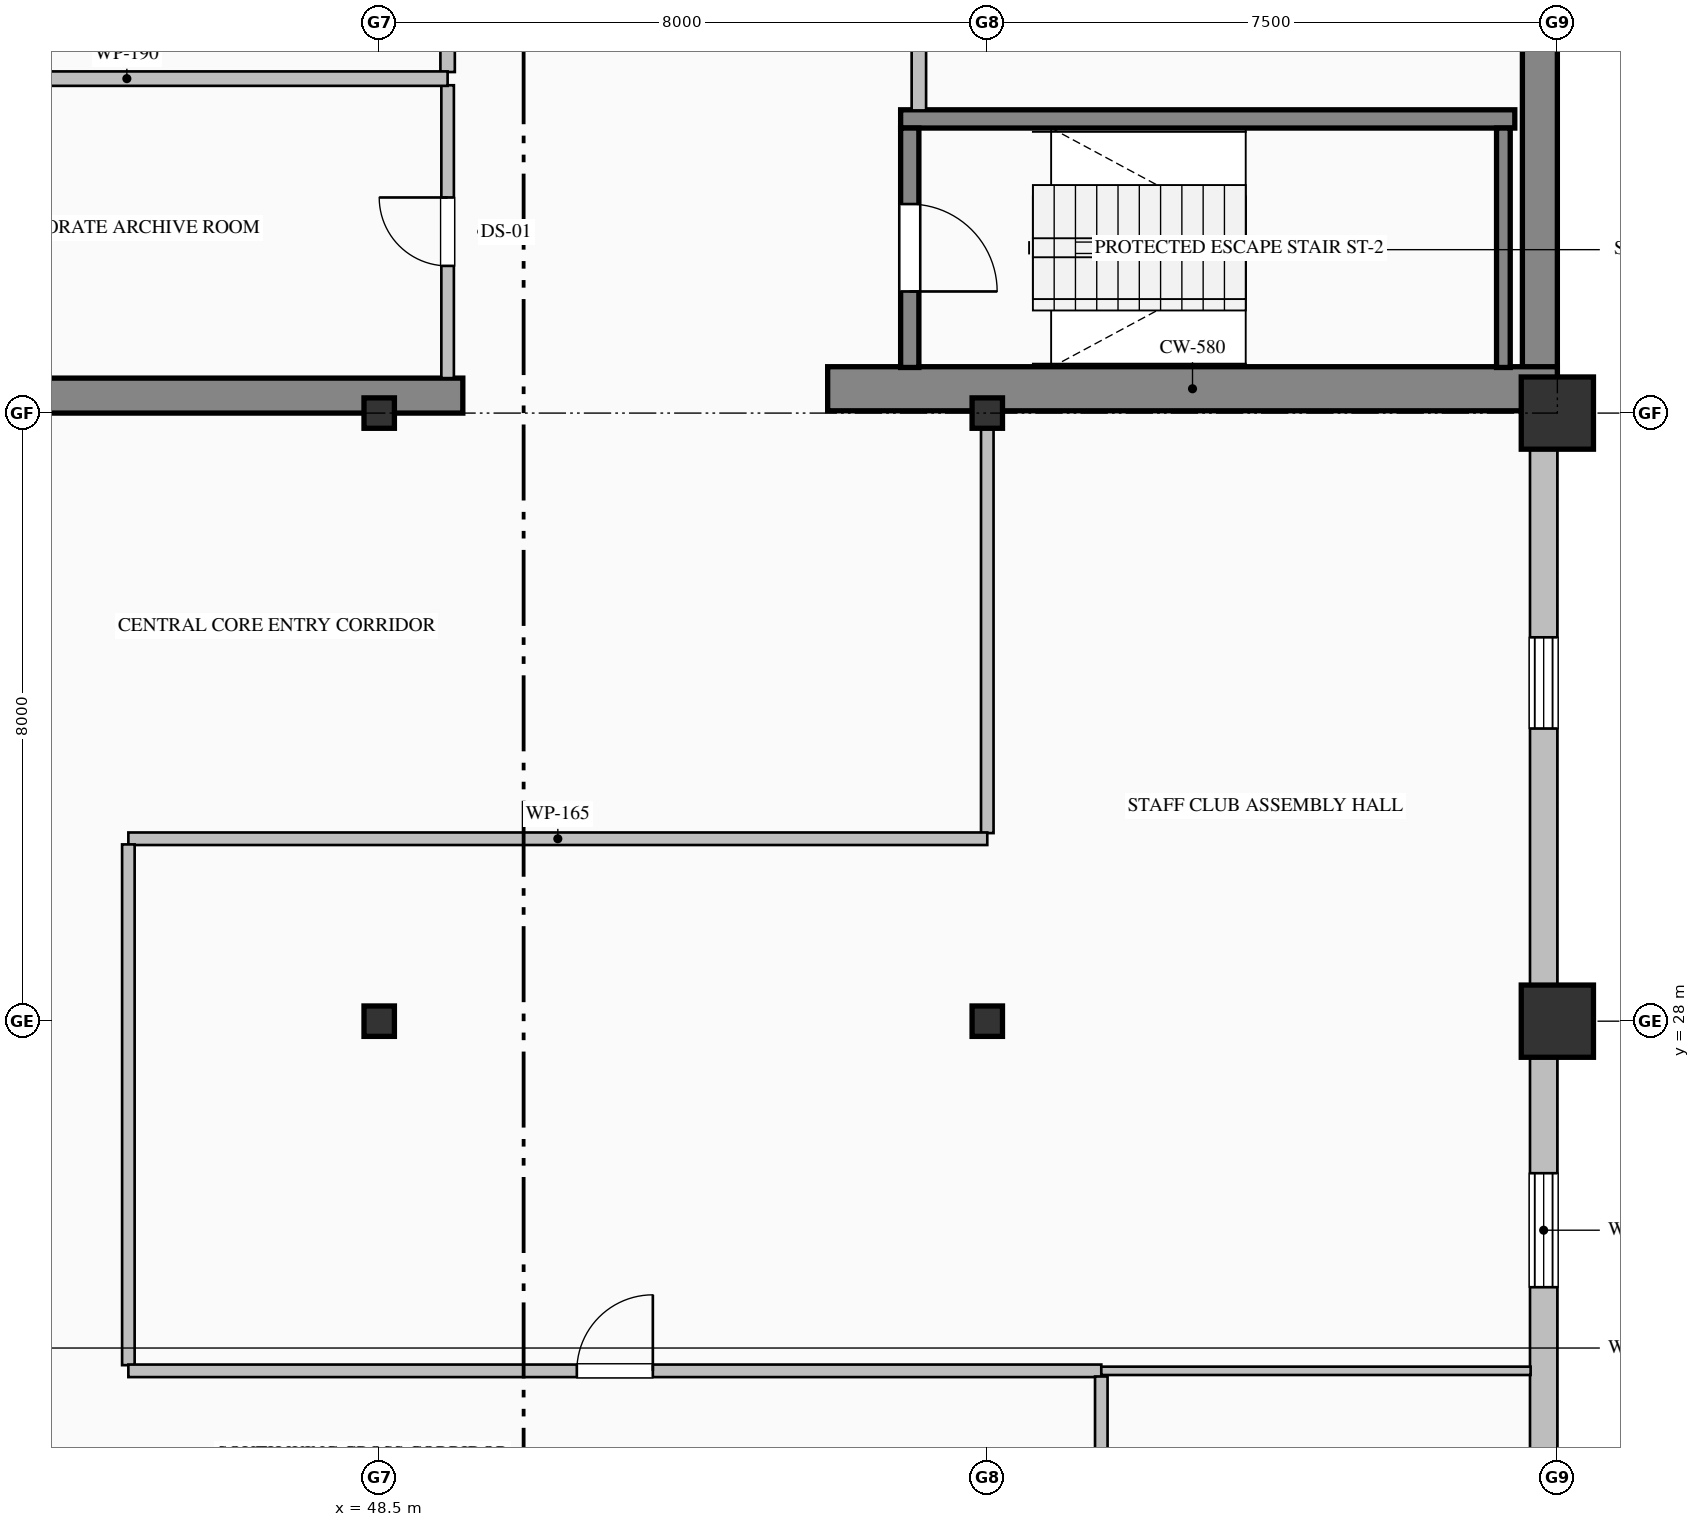
"""IFC4 building model, lengths in metres.
Left out: names, types, materials, properties, quantities, classifications, styles, units other than length and angle.
Written with IfcOpenShell. Run it as: python <this file> out.ifc"""

import sys

from ifc_helpers import new_model, si_unit, direction, frame, frame_2d, origin, origin_2d, place, context, subcontext, project, spatial, rectangle, hollow_rectangle, i_section, extrude, element, fill, save


model = new_model("IFC4")
c1 = context("Model", 3, precision=1e-05, world=origin(), true_north=direction((0.0, 1.0)))
c2 = subcontext(c1, "Body", "Model", "MODEL_VIEW")
j1 = project(units=[si_unit("LENGTHUNIT", "METRE"), si_unit("PLANEANGLEUNIT", "RADIAN")], contexts=[c1])
p1 = place(None, origin())
s1 = spatial("IfcSite", under=j1, at=p1, CompositionType="ELEMENT")
p2 = place(p1, origin())
s2 = spatial("IfcBuilding", under=s1, at=p2, CompositionType="ELEMENT")
p3 = place(p2, frame((0.0, 0.0, 237.8)))
s3 = spatial("IfcBuildingStorey", under=s2, at=p3, CompositionType="ELEMENT", Elevation=237.8)
p4 = place(p3, frame((63.77, 36.32, 0.0), z_axis=(0.0, 0.0, 1.0), x_axis=(0.0, 1.0, 0.0)))
e1 = element("IfcWall", 1, at=p4, inside=s3, PredefinedType="SHEAR", context=c2, shape_type="SweptSolid", body=[
    extrude(rectangle(XDim=15.22, YDim=0.46, at=frame_2d((7.61, 0.0))), origin(), (0.0, 0.0, 1.0), 3.775),
])
p5 = place(p3, frame((40.5, 36.23, 0.0), z_axis=(0.0, 0.0, 1.0), x_axis=(1.0, 0.0, 0.0)))
e2 = element("IfcWall", 2, at=p5, inside=s3, PredefinedType="SHEAR", context=c2, shape_type="SweptSolid", body=[
    extrude(rectangle(XDim=9.1, YDim=0.46, at=frame_2d((4.55, 0.0))), origin(), (0.0, 0.0, 1.0), 3.775),
])
p6 = place(p3, frame((54.4, 36.32, 0.0), z_axis=(0.0, 0.0, 1.0), x_axis=(1.0, 0.0, 0.0)))
e3 = element("IfcWall", 3, at=p6, inside=s3, PredefinedType="SHEAR", context=c2, shape_type="SweptSolid", body=[
    extrude(rectangle(XDim=9.6, YDim=0.58, at=frame_2d((4.8, 0.0))), origin(), (0.0, 0.0, 1.0), 4.0),
])
for number, where, z_axis, x_axis in (
    (4, (48.5, 28.0, 0.0), (0.0, 0.0, 1.0), (1.0, 0.0, 0.0)),
    (5, (48.5, 36.0, 0.0), (0.0, 0.0, 1.0), (1.0, 0.0, 0.0)),
    (6, (56.5, 28.0, 0.0), (0.0, 0.0, 1.0), (1.0, 0.0, 0.0)),
    (7, (56.5, 36.0, 0.0), (0.0, 0.0, 1.0), (1.0, 0.0, 0.0)),
):
    element("IfcColumn", number, at=place(p3, frame(where, z_axis=z_axis, x_axis=x_axis)), inside=s3, PredefinedType="COLUMN", context=c2, shape_type="SweptSolid", body=[
        extrude(i_section(OverallWidth=0.4, OverallDepth=0.4, WebThickness=0.013, FlangeThickness=0.021, FilletRadius=0.022, at=origin_2d()), origin(), (0.0, 0.0, 1.0), 4.0),
    ])
for number, where, z_axis, x_axis in (
    (8, (64.0, 28.0, 0.0), (0.0, 0.0, 1.0), (1.0, 0.0, 0.0)),
    (9, (64.0, 36.0, 0.0), (0.0, 0.0, 1.0), (1.0, 0.0, 0.0)),
):
    element("IfcColumn", number, at=place(p3, frame(where, z_axis=z_axis, x_axis=x_axis)), inside=s3, PredefinedType="COLUMN", context=c2, shape_type="SweptSolid", body=[
        extrude(hollow_rectangle(XDim=0.95, YDim=0.95, WallThickness=0.036, at=origin_2d()), origin(), (0.0, 0.0, 1.0), 4.0),
    ])
p7 = place(p3, frame((63.82, 36.05, 0.0), z_axis=(0.0, 0.0, 1.0), x_axis=(0.0, -1.0, 0.0)))
e10 = element("IfcWall", 10, at=p7, inside=s3, PredefinedType="SOLIDWALL", context=c2, shape_type="SweptSolid", body=[
    extrude(rectangle(XDim=19.55, YDim=0.36, at=frame_2d((9.775, 0.0))), origin(), (0.0, 0.0, 1.0), 3.325),
])
p8 = place(p7, frame((3.0, 0.0, 0.9)))
e11 = element("IfcOpeningElement", 11, at=p8, cuts=e10, PredefinedType="OPENING", context=c2, shape_type="SweptSolid", body=[
    extrude(rectangle(XDim=1.2, YDim=1.85, at=frame_2d((0.6, 0.925))), frame((0.0, 0.19, 0.0), z_axis=(0.0, -1.0, 0.0), x_axis=(1.0, 0.0, 0.0)), (0.0, 0.0, 1.0), 0.38),
])
p9 = place(p7, frame((10.05, 0.0, 0.7)))
e12 = element("IfcOpeningElement", 12, at=p9, cuts=e10, PredefinedType="OPENING", context=c2, shape_type="SweptSolid", body=[
    extrude(rectangle(XDim=1.5, YDim=2.4, at=frame_2d((0.75, 1.2))), frame((0.0, 0.19, 0.0), z_axis=(0.0, -1.0, 0.0), x_axis=(1.0, 0.0, 0.0)), (0.0, 0.0, 1.0), 0.38),
])
p10 = place(p7, frame((13.8, 0.0, 0.9)))
e13 = element("IfcOpeningElement", 13, at=p10, cuts=e10, PredefinedType="OPENING", context=c2, shape_type="SweptSolid", body=[
    extrude(rectangle(XDim=1.2, YDim=1.85, at=frame_2d((0.6, 0.925))), frame((0.0, 0.19, 0.0), z_axis=(0.0, -1.0, 0.0), x_axis=(1.0, 0.0, 0.0)), (0.0, 0.0, 1.0), 0.38),
])
p11 = place(p3, frame((55.36, 39.87, 0.0), z_axis=(0.0, 0.0, 1.0), x_axis=(1.0, 0.0, 0.0)))
e14 = element("IfcWall", 14, at=p11, inside=s3, PredefinedType="SOLIDWALL", context=c2, shape_type="SweptSolid", body=[
    extrude(rectangle(XDim=8.08, YDim=0.24, at=frame_2d((4.04, 0.0))), origin(), (0.0, 0.0, 1.0), 4.0),
])
p12 = place(p3, frame((55.48, 39.75, 0.0), z_axis=(0.0, 0.0, 1.0), x_axis=(0.0, -1.0, 0.0)))
e15 = element("IfcWall", 15, at=p12, inside=s3, PredefinedType="SOLIDWALL", context=c2, shape_type="SweptSolid", body=[
    extrude(rectangle(XDim=3.15, YDim=0.24, at=frame_2d((1.575, 0.0))), origin(), (0.0, 0.0, 1.0), 4.0),
])
p13 = place(p12, frame((1.0, 0.0, 0.0)))
e16 = element("IfcOpeningElement", 16, at=p13, cuts=e15, PredefinedType="OPENING", context=c2, shape_type="SweptSolid", body=[
    extrude(rectangle(XDim=1.15, YDim=2.2, at=frame_2d((0.575, 1.1))), frame((0.0, 0.13, 0.0), z_axis=(0.0, -1.0, 0.0), x_axis=(1.0, 0.0, 0.0)), (0.0, 0.0, 1.0), 0.26),
])
p14 = place(p3, frame((63.29, 36.6, 0.0), z_axis=(0.0, 0.0, 1.0), x_axis=(0.0, 1.0, 0.0)))
e17 = element("IfcWall", 17, at=p14, inside=s3, PredefinedType="SOLIDWALL", context=c2, shape_type="SweptSolid", body=[
    extrude(rectangle(XDim=3.15, YDim=0.18, at=frame_2d((1.575, 0.0))), origin(), (0.0, 0.0, 1.0), 4.0),
])
p15 = place(p3, frame((49.4, 36.46, 0.0), z_axis=(0.0, 0.0, 1.0), x_axis=(0.0, 1.0, 0.0)))
e18 = element("IfcWall", 18, at=p15, inside=s3, PredefinedType="PARTITIONING", context=c2, shape_type="SweptSolid", body=[
    extrude(rectangle(XDim=3.853, YDim=0.165, at=frame_2d((1.927, 0.0))), origin(), (0.0, 0.0, 1.0), 3.017),
])
p16 = place(p15, frame((1.477, 0.0, 0.0)))
e19 = element("IfcOpeningElement", 19, at=p16, cuts=e18, PredefinedType="OPENING", context=c2, shape_type="SweptSolid", body=[
    extrude(rectangle(XDim=0.9, YDim=2.15, at=frame_2d((0.45, 1.075))), frame((0.0, 0.093, 0.0), z_axis=(0.0, -1.0, 0.0), x_axis=(1.0, 0.0, 0.0)), (0.0, 0.0, 1.0), 0.185),
])
p17 = place(p3, frame((49.4, 40.487, 0.0), z_axis=(0.0, 0.0, 1.0), x_axis=(0.0, 1.0, 0.0)))
e20 = element("IfcWall", 20, at=p17, inside=s3, PredefinedType="PARTITIONING", context=c2, shape_type="SweptSolid", body=[
    extrude(rectangle(XDim=3.663, YDim=0.19, at=frame_2d((1.832, 0.0))), origin(), (0.0, 0.0, 1.0), 3.017),
])
p18 = place(p17, frame((1.132, 0.0, 0.0)))
e21 = element("IfcOpeningElement", 21, at=p18, cuts=e20, PredefinedType="OPENING", context=c2, shape_type="SweptSolid", body=[
    extrude(rectangle(XDim=1.4, YDim=2.25, at=frame_2d((0.7, 1.125))), frame((0.0, 0.105, 0.0), z_axis=(0.0, -1.0, 0.0), x_axis=(1.0, 0.0, 0.0)), (0.0, 0.0, 1.0), 0.21),
])
p19 = place(p3, frame((55.6, 42.713, 0.0), z_axis=(0.0, 0.0, 1.0), x_axis=(0.0, -1.0, 0.0)))
e22 = element("IfcWall", 22, at=p19, inside=s3, PredefinedType="PARTITIONING", context=c2, shape_type="SweptSolid", body=[
    extrude(rectangle(XDim=2.731, YDim=0.19, at=frame_2d((1.365, 0.0))), origin(), (0.0, 0.0, 1.0), 3.775),
])
p20 = place(p3, frame((40.96, 40.4, 0.0), z_axis=(0.0, 0.0, 1.0), x_axis=(1.0, 0.0, 0.0)))
e23 = element("IfcWall", 23, at=p20, inside=s3, PredefinedType="PARTITIONING", context=c2, shape_type="SweptSolid", body=[
    extrude(rectangle(XDim=8.44, YDim=0.19, at=frame_2d((4.22, 0.0))), origin(), (0.0, 0.0, 1.0), 3.775),
])
p21 = place(p3, frame((56.5, 36.0, 0.0), z_axis=(0.0, 0.0, 1.0), x_axis=(0.0, -1.0, 0.0)))
e24 = element("IfcWall", 24, at=p21, inside=s3, PredefinedType="PARTITIONING", context=c2, shape_type="SweptSolid", body=[
    extrude(rectangle(XDim=5.525, YDim=0.165, at=frame_2d((2.763, 0.0))), origin(), (0.0, 0.0, 1.0), 3.179),
])
p22 = place(p3, frame((56.5, 30.4, 0.0), z_axis=(0.0, 0.0, 1.0), x_axis=(-1.0, 0.0, 0.0)))
e25 = element("IfcWall", 25, at=p22, inside=s3, PredefinedType="PARTITIONING", context=c2, shape_type="SweptSolid", body=[
    extrude(rectangle(XDim=11.3, YDim=0.165, at=frame_2d((5.65, 0.0))), origin(), (0.0, 0.0, 1.0), 3.775),
])
p23 = place(p3, frame((45.2, 30.325, 0.0), z_axis=(0.0, 0.0, 1.0), x_axis=(0.0, -1.0, 0.0)))
e26 = element("IfcWall", 26, at=p23, inside=s3, PredefinedType="PARTITIONING", context=c2, shape_type="SweptSolid", body=[
    extrude(rectangle(XDim=6.851, YDim=0.165, at=frame_2d((3.425, 0.0))), origin(), (0.0, 0.0, 1.0), 3.775),
])
p24 = place(p3, frame((45.2, 23.4, 0.0), z_axis=(0.0, 0.0, 1.0), x_axis=(1.0, 0.0, 0.0)))
e27 = element("IfcWall", 27, at=p24, inside=s3, PredefinedType="PARTITIONING", context=c2, shape_type="SweptSolid", body=[
    extrude(rectangle(XDim=12.8, YDim=0.165, at=frame_2d((6.4, 0.0))), origin(), (0.0, 0.0, 1.0), 3.467),
])
p25 = place(p24, frame((5.9, 0.0, 0.0)))
e28 = element("IfcOpeningElement", 28, at=p25, cuts=e27, PredefinedType="OPENING", context=c2, shape_type="SweptSolid", body=[
    extrude(rectangle(XDim=1.0, YDim=2.15, at=frame_2d((0.5, 1.075))), frame((0.0, 0.093, 0.0), z_axis=(0.0, -1.0, 0.0), x_axis=(1.0, 0.0, 0.0)), (0.0, 0.0, 1.0), 0.185),
])
p26 = place(p3, frame((58.0, 23.325, 0.0), z_axis=(0.0, 0.0, 1.0), x_axis=(0.0, -1.0, 0.0)))
e29 = element("IfcWall", 29, at=p26, inside=s3, PredefinedType="PARTITIONING", context=c2, shape_type="SweptSolid", body=[
    extrude(rectangle(XDim=2.051, YDim=0.165, at=frame_2d((1.025, 0.0))), origin(), (0.0, 0.0, 1.0), 3.775),
])
p27 = place(p3, frame((63.648, 23.4, 0.0), z_axis=(0.0, 0.0, 1.0), x_axis=(-1.0, 0.0, 0.0)))
e30 = element("IfcWall", 30, at=p27, inside=s3, PredefinedType="MOVABLE", context=c2, shape_type="SweptSolid", body=[
    extrude(rectangle(XDim=5.648, YDim=0.11, at=frame_2d((2.824, 0.0))), origin(), (0.0, 0.0, 1.0), 3.775),
])
p28 = place(p8, origin())
e31 = element("IfcWindow", 31, at=p28, inside=s3, PartitioningType="DOUBLE_PANEL_VERTICAL", PredefinedType="WINDOW", context=c2, shape_type="SweptSolid", body=[
    extrude(rectangle(XDim=1.2, YDim=1.85, at=frame_2d((0.6, 0.925))), frame((0.0, 0.15, 0.0), z_axis=(0.0, -1.0, 0.0), x_axis=(1.0, 0.0, 0.0)), (0.0, 0.0, 1.0), 0.06),
])
fill(e11, e31)
p29 = place(p9, origin())
e32 = element("IfcWindow", 32, at=p29, inside=s3, PartitioningType="DOUBLE_PANEL_HORIZONTAL", PredefinedType="WINDOW", context=c2, shape_type="SweptSolid", body=[
    extrude(rectangle(XDim=1.5, YDim=2.4, at=frame_2d((0.75, 1.2))), frame((0.0, 0.15, 0.0), z_axis=(0.0, -1.0, 0.0), x_axis=(1.0, 0.0, 0.0)), (0.0, 0.0, 1.0), 0.06),
])
fill(e12, e32)
p30 = place(p13, origin())
e33 = element("IfcDoor", 33, at=p30, inside=s3, OperationType="SINGLE_SWING_RIGHT", PredefinedType="DOOR", context=c2, shape_type="SweptSolid", body=[
    extrude(rectangle(XDim=1.15, YDim=2.2, at=frame_2d((0.575, 1.1))), frame((0.0, 0.025, 0.0), z_axis=(0.0, -1.0, 0.0), x_axis=(1.0, 0.0, 0.0)), (0.0, 0.0, 1.0), 0.05),
])
fill(e16, e33)
p31 = place(p16, origin())
e34 = element("IfcDoor", 34, at=p31, inside=s3, OperationType="SINGLE_SWING_RIGHT", PredefinedType="DOOR", context=c2, shape_type="SweptSolid", body=[
    extrude(rectangle(XDim=0.9, YDim=2.15, at=frame_2d((0.45, 1.075))), frame((0.0, 0.025, 0.0), z_axis=(0.0, -1.0, 0.0), x_axis=(1.0, 0.0, 0.0)), (0.0, 0.0, 1.0), 0.05),
])
fill(e19, e34)
p32 = place(p25, origin())
e35 = element("IfcDoor", 35, at=p32, inside=s3, OperationType="SINGLE_SWING_RIGHT", PredefinedType="DOOR", context=c2, shape_type="SweptSolid", body=[
    extrude(rectangle(XDim=1.0, YDim=2.15, at=frame_2d((0.5, 1.075))), frame((0.0, 0.025, 0.0), z_axis=(0.0, -1.0, 0.0), x_axis=(1.0, 0.0, 0.0)), (0.0, 0.0, 1.0), 0.05),
])
fill(e28, e35)
save(model, sys.argv[1])
